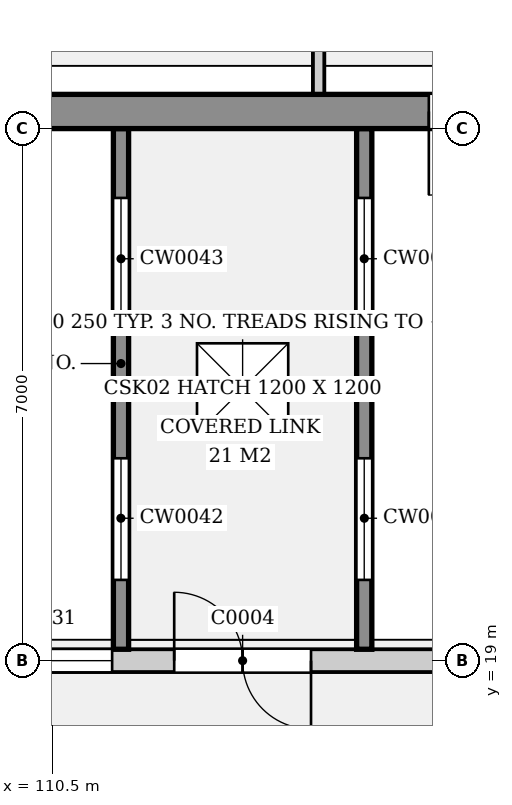
"""IFC4 building model, lengths in metres.
Left out: names, types, materials, properties, quantities, classifications, styles, units other than length and angle.
Written with IfcOpenShell. Run it as: python <this file> out.ifc"""

import sys

from ifc_helpers import new_model, si_unit, direction, frame, frame_2d, origin, origin_2d, place, context, subcontext, project, spatial, rectangle, extrude, element, fill, save


model = new_model("IFC4")
c1 = context("Model", 3, precision=1e-05, world=origin(), true_north=direction((0.0, 1.0)))
c2 = subcontext(c1, "Body", "Model", "MODEL_VIEW")
j1 = project(units=[si_unit("LENGTHUNIT", "METRE"), si_unit("PLANEANGLEUNIT", "RADIAN")], contexts=[c1])
p1 = place(None, origin())
s1 = spatial("IfcSite", under=j1, at=p1, CompositionType="ELEMENT")
p2 = place(p1, origin())
s2 = spatial("IfcBuilding", under=s1, at=p2, CompositionType="ELEMENT")
p3 = place(p2, origin())
s3 = spatial("IfcBuildingStorey", under=s2, at=p3, CompositionType="ELEMENT", Elevation=0.0)
p4 = place(p3, frame((64.0, 26.225, 0.0), z_axis=(0.0, 0.0, 1.0), x_axis=(1.0, 0.0, 0.0)))
e1 = element("IfcWall", 1, at=p4, inside=s3, PredefinedType="ELEMENTEDWALL", context=c2, shape_type="SweptSolid", body=[
    extrude(rectangle(XDim=76.0, YDim=0.45, at=frame_2d((38.0, 0.0))), origin(), (0.0, 0.0, 1.0), 5.0),
])
p5 = place(p4, frame((10.55, 0.0, 0.0), z_axis=(0.0, 0.0, 1.0), x_axis=(-1.0, 0.0, 0.0)))
e2 = element("IfcOpeningElement", 2, at=p5, cuts=e1, PredefinedType="OPENING", context=c2, shape_type="SweptSolid", body=[
    extrude(rectangle(XDim=1.1, YDim=2.2, at=frame_2d((0.55, 1.1))), frame((0.0, 0.235, 0.0), z_axis=(0.0, -1.0, 0.0), x_axis=(1.0, 0.0, 0.0)), (0.0, 0.0, 1.0), 0.47),
])
p6 = place(p4, frame((24.55, 0.0, 0.0), z_axis=(0.0, 0.0, 1.0), x_axis=(-1.0, 0.0, 0.0)))
e3 = element("IfcOpeningElement", 3, at=p6, cuts=e1, PredefinedType="OPENING", context=c2, shape_type="SweptSolid", body=[
    extrude(rectangle(XDim=1.1, YDim=2.2, at=frame_2d((0.55, 1.1))), frame((0.0, 0.235, 0.0), z_axis=(0.0, -1.0, 0.0), x_axis=(1.0, 0.0, 0.0)), (0.0, 0.0, 1.0), 0.47),
])
p7 = place(p4, frame((38.55, 0.0, 0.0), z_axis=(0.0, 0.0, 1.0), x_axis=(-1.0, 0.0, 0.0)))
e4 = element("IfcOpeningElement", 4, at=p7, cuts=e1, PredefinedType="OPENING", context=c2, shape_type="SweptSolid", body=[
    extrude(rectangle(XDim=1.1, YDim=2.2, at=frame_2d((0.55, 1.1))), frame((0.0, 0.235, 0.0), z_axis=(0.0, -1.0, 0.0), x_axis=(1.0, 0.0, 0.0)), (0.0, 0.0, 1.0), 0.47),
])
p8 = place(p4, frame((52.55, 0.0, 0.0), z_axis=(0.0, 0.0, 1.0), x_axis=(-1.0, 0.0, 0.0)))
e5 = element("IfcOpeningElement", 5, at=p8, cuts=e1, PredefinedType="OPENING", context=c2, shape_type="SweptSolid", body=[
    extrude(rectangle(XDim=1.1, YDim=2.2, at=frame_2d((0.55, 1.1))), frame((0.0, 0.235, 0.0), z_axis=(0.0, -1.0, 0.0), x_axis=(1.0, 0.0, 0.0)), (0.0, 0.0, 1.0), 0.47),
])
p9 = place(p4, frame((66.55, 0.0, 0.0), z_axis=(0.0, 0.0, 1.0), x_axis=(-1.0, 0.0, 0.0)))
e6 = element("IfcOpeningElement", 6, at=p9, cuts=e1, PredefinedType="OPENING", context=c2, shape_type="SweptSolid", body=[
    extrude(rectangle(XDim=1.1, YDim=2.2, at=frame_2d((0.55, 1.1))), frame((0.0, 0.235, 0.0), z_axis=(0.0, -1.0, 0.0), x_axis=(1.0, 0.0, 0.0)), (0.0, 0.0, 1.0), 0.47),
])
p10 = place(p4, frame((16.0, 0.0, 3.2)))
e7 = element("IfcOpeningElement", 7, at=p10, cuts=e1, PredefinedType="OPENING", context=c2, shape_type="SweptSolid", body=[
    extrude(rectangle(XDim=2.0, YDim=1.0, at=frame_2d((1.0, 0.5))), frame((0.0, 0.235, 0.0), z_axis=(0.0, -1.0, 0.0), x_axis=(1.0, 0.0, 0.0)), (0.0, 0.0, 1.0), 0.47),
])
p11 = place(p4, frame((30.0, 0.0, 3.2)))
e8 = element("IfcOpeningElement", 8, at=p11, cuts=e1, PredefinedType="OPENING", context=c2, shape_type="SweptSolid", body=[
    extrude(rectangle(XDim=2.0, YDim=1.0, at=frame_2d((1.0, 0.5))), frame((0.0, 0.235, 0.0), z_axis=(0.0, -1.0, 0.0), x_axis=(1.0, 0.0, 0.0)), (0.0, 0.0, 1.0), 0.47),
])
p12 = place(p4, frame((44.0, 0.0, 3.2)))
e9 = element("IfcOpeningElement", 9, at=p12, cuts=e1, PredefinedType="OPENING", context=c2, shape_type="SweptSolid", body=[
    extrude(rectangle(XDim=2.0, YDim=1.0, at=frame_2d((1.0, 0.5))), frame((0.0, 0.235, 0.0), z_axis=(0.0, -1.0, 0.0), x_axis=(1.0, 0.0, 0.0)), (0.0, 0.0, 1.0), 0.47),
])
p13 = place(p4, frame((58.0, 0.0, 3.2)))
e10 = element("IfcOpeningElement", 10, at=p13, cuts=e1, PredefinedType="OPENING", context=c2, shape_type="SweptSolid", body=[
    extrude(rectangle(XDim=2.0, YDim=1.0, at=frame_2d((1.0, 0.5))), frame((0.0, 0.235, 0.0), z_axis=(0.0, -1.0, 0.0), x_axis=(1.0, 0.0, 0.0)), (0.0, 0.0, 1.0), 0.47),
])
p14 = place(p3, frame((108.225, 19.0, 0.0), z_axis=(0.0, 0.0, 1.0), x_axis=(1.0, 0.0, 0.0)))
e11 = element("IfcWall", 11, at=p14, inside=s3, PredefinedType="ELEMENTEDWALL", context=c2, shape_type="SweptSolid", body=[
    extrude(rectangle(XDim=11.55, YDim=0.3, at=frame_2d((5.775, 0.0))), origin(), (0.0, 0.0, 1.0), 4.6),
])
p15 = place(p14, frame((1.458, 0.0, 2.5)))
e12 = element("IfcOpeningElement", 12, at=p15, cuts=e11, PredefinedType="OPENING", context=c2, shape_type="SweptSolid", body=[
    extrude(rectangle(XDim=1.6, YDim=1.0, at=frame_2d((0.8, 0.5))), frame((0.0, 0.16, 0.0), z_axis=(0.0, -1.0, 0.0), x_axis=(1.0, 0.0, 0.0)), (0.0, 0.0, 1.0), 0.32),
])
p16 = place(p14, frame((8.492, 0.0, 2.5)))
e13 = element("IfcOpeningElement", 13, at=p16, cuts=e11, PredefinedType="OPENING", context=c2, shape_type="SweptSolid", body=[
    extrude(rectangle(XDim=1.6, YDim=1.0, at=frame_2d((0.8, 0.5))), frame((0.0, 0.16, 0.0), z_axis=(0.0, -1.0, 0.0), x_axis=(1.0, 0.0, 0.0)), (0.0, 0.0, 1.0), 0.32),
])
p17 = place(p14, frame((3.875, 0.0, 0.0)))
e14 = element("IfcOpeningElement", 14, at=p17, cuts=e11, PredefinedType="OPENING", context=c2, shape_type="SweptSolid", body=[
    extrude(rectangle(XDim=1.8, YDim=2.4, at=frame_2d((0.9, 1.2))), frame((0.0, 0.16, 0.0), z_axis=(0.0, -1.0, 0.0), x_axis=(1.0, 0.0, 0.0)), (0.0, 0.0, 1.0), 0.32),
])
p18 = place(p3, frame((111.4, 19.15, 0.0), z_axis=(0.0, 0.0, 1.0), x_axis=(0.0, 1.0, 0.0)))
e15 = element("IfcWall", 15, at=p18, inside=s3, PredefinedType="ELEMENTEDWALL", context=c2, shape_type="SweptSolid", body=[
    extrude(rectangle(XDim=6.85, YDim=0.2, at=frame_2d((3.425, 0.0))), origin(), (0.0, 0.0, 1.0), 3.2),
])
p19 = place(p18, frame((0.913, 0.0, 0.9)))
e16 = element("IfcOpeningElement", 16, at=p19, cuts=e15, PredefinedType="OPENING", context=c2, shape_type="SweptSolid", body=[
    extrude(rectangle(XDim=1.6, YDim=1.6, at=frame_2d((0.8, 0.8))), frame((0.0, 0.11, 0.0), z_axis=(0.0, -1.0, 0.0), x_axis=(1.0, 0.0, 0.0)), (0.0, 0.0, 1.0), 0.22),
])
p20 = place(p18, frame((4.337, 0.0, 0.9)))
e17 = element("IfcOpeningElement", 17, at=p20, cuts=e15, PredefinedType="OPENING", context=c2, shape_type="SweptSolid", body=[
    extrude(rectangle(XDim=1.6, YDim=1.6, at=frame_2d((0.8, 0.8))), frame((0.0, 0.11, 0.0), z_axis=(0.0, -1.0, 0.0), x_axis=(1.0, 0.0, 0.0)), (0.0, 0.0, 1.0), 0.22),
])
p21 = place(p3, frame((114.6, 19.15, 0.0), z_axis=(0.0, 0.0, 1.0), x_axis=(0.0, 1.0, 0.0)))
e18 = element("IfcWall", 18, at=p21, inside=s3, PredefinedType="ELEMENTEDWALL", context=c2, shape_type="SweptSolid", body=[
    extrude(rectangle(XDim=6.85, YDim=0.2, at=frame_2d((3.425, 0.0))), origin(), (0.0, 0.0, 1.0), 3.2),
])
p22 = place(p21, frame((0.913, 0.0, 0.9)))
e19 = element("IfcOpeningElement", 19, at=p22, cuts=e18, PredefinedType="OPENING", context=c2, shape_type="SweptSolid", body=[
    extrude(rectangle(XDim=1.6, YDim=1.6, at=frame_2d((0.8, 0.8))), frame((0.0, 0.11, 0.0), z_axis=(0.0, -1.0, 0.0), x_axis=(1.0, 0.0, 0.0)), (0.0, 0.0, 1.0), 0.22),
])
p23 = place(p21, frame((4.337, 0.0, 0.9)))
e20 = element("IfcOpeningElement", 20, at=p23, cuts=e18, PredefinedType="OPENING", context=c2, shape_type="SweptSolid", body=[
    extrude(rectangle(XDim=1.6, YDim=1.6, at=frame_2d((0.8, 0.8))), frame((0.0, 0.11, 0.0), z_axis=(0.0, -1.0, 0.0), x_axis=(1.0, 0.0, 0.0)), (0.0, 0.0, 1.0), 0.22),
])
p24 = place(p3, frame((114.0, 26.45, 0.0), z_axis=(0.0, 0.0, 1.0), x_axis=(0.0, 1.0, 0.0)))
e21 = element("IfcWall", 21, at=p24, inside=s3, PredefinedType="PARTITIONING", context=c2, shape_type="SweptSolid", body=[
    extrude(rectangle(XDim=3.345, YDim=0.15, at=frame_2d((1.672, 0.0))), origin(), (0.0, 0.0, 1.0), 4.75),
])
p25 = place(p3, frame((0.0, 0.0, 3.2)))
p26 = place(p25, frame((113.0, 22.575, 0.0)))
p27 = place(p26, frame((0.0, 0.0, 0.15)))
e22 = element("IfcWindow", 22, at=p27, inside=s3, PartitioningType="SINGLE_PANEL", PredefinedType="SKYLIGHT", context=c2, shape_type="SweptSolid", body=[
    extrude(rectangle(XDim=1.2, YDim=1.2, at=origin_2d()), origin(), (0.0, 0.0, 1.0), 0.05),
])
p28 = place(p8, origin())
e23 = element("IfcDoor", 23, at=p28, inside=s3, OperationType="SINGLE_SWING_LEFT", PredefinedType="DOOR", context=c2, shape_type="SweptSolid", body=[
    extrude(rectangle(XDim=1.1, YDim=2.2, at=frame_2d((0.55, 1.1))), frame((0.0, 0.025, 0.0), z_axis=(0.0, -1.0, 0.0), x_axis=(1.0, 0.0, 0.0)), (0.0, 0.0, 1.0), 0.05),
])
fill(e5, e23)
p29 = place(p15, origin())
e24 = element("IfcWindow", 24, at=p29, inside=s3, PartitioningType="SINGLE_PANEL", PredefinedType="WINDOW", context=c2, shape_type="SweptSolid", body=[
    extrude(rectangle(XDim=1.6, YDim=1.0, at=frame_2d((0.8, 0.5))), frame((0.0, 0.03, 0.0), z_axis=(0.0, -1.0, 0.0), x_axis=(1.0, 0.0, 0.0)), (0.0, 0.0, 1.0), 0.06),
])
fill(e12, e24)
p30 = place(p17, origin())
e25 = element("IfcDoor", 25, at=p30, inside=s3, OperationType="DOUBLE_DOOR_SINGLE_SWING", PredefinedType="DOOR", context=c2, shape_type="SweptSolid", body=[
    extrude(rectangle(XDim=1.8, YDim=2.4, at=frame_2d((0.9, 1.2))), frame((0.0, 0.025, 0.0), z_axis=(0.0, -1.0, 0.0), x_axis=(1.0, 0.0, 0.0)), (0.0, 0.0, 1.0), 0.05),
])
fill(e14, e25)
p31 = place(p19, origin())
e26 = element("IfcWindow", 26, at=p31, inside=s3, PartitioningType="SINGLE_PANEL", PredefinedType="WINDOW", context=c2, shape_type="SweptSolid", body=[
    extrude(rectangle(XDim=1.6, YDim=1.6, at=frame_2d((0.8, 0.8))), frame((0.0, 0.03, 0.0), z_axis=(0.0, -1.0, 0.0), x_axis=(1.0, 0.0, 0.0)), (0.0, 0.0, 1.0), 0.06),
])
fill(e16, e26)
p32 = place(p20, origin())
e27 = element("IfcWindow", 27, at=p32, inside=s3, PartitioningType="SINGLE_PANEL", PredefinedType="WINDOW", context=c2, shape_type="SweptSolid", body=[
    extrude(rectangle(XDim=1.6, YDim=1.6, at=frame_2d((0.8, 0.8))), frame((0.0, 0.03, 0.0), z_axis=(0.0, -1.0, 0.0), x_axis=(1.0, 0.0, 0.0)), (0.0, 0.0, 1.0), 0.06),
])
fill(e17, e27)
p33 = place(p22, origin())
e28 = element("IfcWindow", 28, at=p33, inside=s3, PartitioningType="SINGLE_PANEL", PredefinedType="WINDOW", context=c2, shape_type="SweptSolid", body=[
    extrude(rectangle(XDim=1.6, YDim=1.6, at=frame_2d((0.8, 0.8))), frame((0.0, 0.03, 0.0), z_axis=(0.0, -1.0, 0.0), x_axis=(1.0, 0.0, 0.0)), (0.0, 0.0, 1.0), 0.06),
])
fill(e19, e28)
p34 = place(p23, origin())
e29 = element("IfcWindow", 29, at=p34, inside=s3, PartitioningType="SINGLE_PANEL", PredefinedType="WINDOW", context=c2, shape_type="SweptSolid", body=[
    extrude(rectangle(XDim=1.6, YDim=1.6, at=frame_2d((0.8, 0.8))), frame((0.0, 0.03, 0.0), z_axis=(0.0, -1.0, 0.0), x_axis=(1.0, 0.0, 0.0)), (0.0, 0.0, 1.0), 0.06),
])
fill(e20, e29)
save(model, sys.argv[1])
